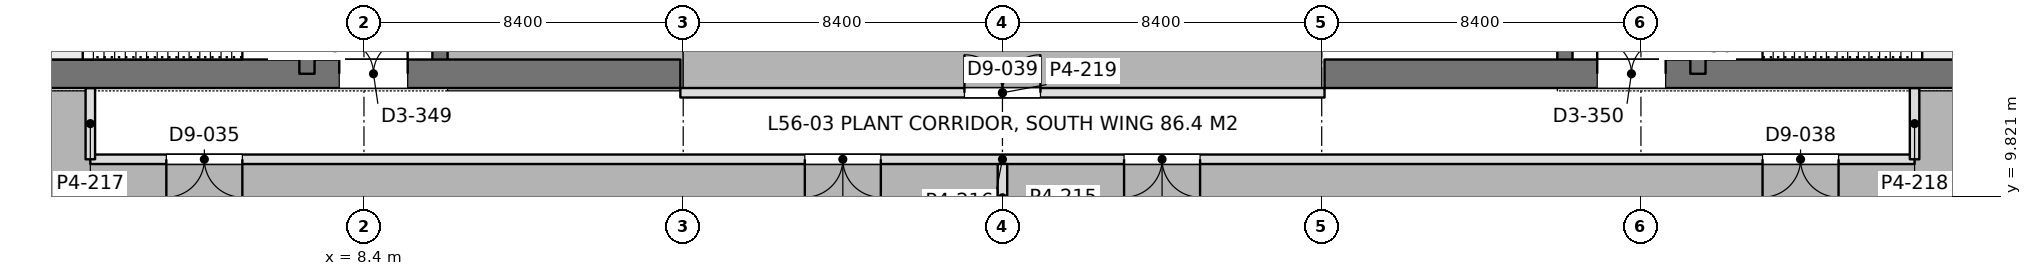
"""IFC4 building model, lengths in metres.
Left out: names, types, materials, properties, quantities, classifications, styles, units other than length and angle.
Written with IfcOpenShell. Run it as: python <this file> out.ifc"""

import sys

from ifc_helpers import new_model, si_unit, direction, frame, frame_2d, origin, place, context, subcontext, project, spatial, rectangle, extrude, element, fill, save


model = new_model("IFC4")
c1 = context("Model", 3, precision=1e-05, world=origin(), true_north=direction((0.0, 1.0)))
c2 = subcontext(c1, "Body", "Model", "MODEL_VIEW")
j1 = project(units=[si_unit("LENGTHUNIT", "METRE"), si_unit("PLANEANGLEUNIT", "RADIAN")], contexts=[c1])
p1 = place(None, origin())
s1 = spatial("IfcSite", under=j1, at=p1, CompositionType="ELEMENT")
p2 = place(p1, origin())
s2 = spatial("IfcBuilding", under=s1, at=p2, CompositionType="ELEMENT")
p3 = place(p2, frame((0.0, 0.0, 244.8)))
s3 = spatial("IfcBuildingStorey", under=s2, at=p3, CompositionType="ELEMENT", Elevation=244.8)
p4 = place(p3, frame((-1.125, 13.05, 0.0), z_axis=(0.0, 0.0, 1.0), x_axis=(1.0, 0.0, 0.0)))
e1 = element("IfcWall", 1, at=p4, inside=s3, PredefinedType="SHEAR", context=c2, shape_type="SweptSolid", body=[
    extrude(rectangle(XDim=17.85, YDim=0.75, at=frame_2d((8.925, 0.0))), origin(), (0.0, 0.0, 1.0), 5.4),
])
p5 = place(p4, frame((8.875, 0.0, 0.0)))
e2 = element("IfcOpeningElement", 2, at=p5, cuts=e1, PredefinedType="OPENING", context=c2, shape_type="SweptSolid", body=[
    extrude(rectangle(XDim=1.8, YDim=2.4, at=frame_2d((0.9, 1.2))), frame((0.0, 0.385, 0.0), z_axis=(0.0, -1.0, 0.0), x_axis=(1.0, 0.0, 0.0)), (0.0, 0.0, 1.0), 0.77),
])
p6 = place(p3, frame((6.9, 13.05, 0.0), z_axis=(0.0, 0.0, 1.0), x_axis=(0.0, 1.0, 0.0)))
e3 = element("IfcWall", 3, at=p6, inside=s3, PredefinedType="SHEAR", context=c2, shape_type="SweptSolid", body=[
    extrude(rectangle(XDim=24.3, YDim=0.4, at=frame_2d((12.15, 0.0))), origin(), (0.0, 0.0, 1.0), 5.4),
])
p7 = place(p6, frame((1.3, 0.0, 0.0)))
e4 = element("IfcOpeningElement", 4, at=p7, cuts=e3, PredefinedType="OPENING", context=c2, shape_type="SweptSolid", body=[
    extrude(rectangle(XDim=1.0, YDim=2.2, at=frame_2d((0.5, 1.1))), frame((0.0, 0.21, 0.0), z_axis=(0.0, -1.0, 0.0), x_axis=(1.0, 0.0, 0.0)), (0.0, 0.0, 1.0), 0.42),
])
p8 = place(p6, frame((22.0, 0.0, 0.0)))
e5 = element("IfcOpeningElement", 5, at=p8, cuts=e3, PredefinedType="OPENING", context=c2, shape_type="SweptSolid", body=[
    extrude(rectangle(XDim=1.0, YDim=2.2, at=frame_2d((0.5, 1.1))), frame((0.0, 0.21, 0.0), z_axis=(0.0, -1.0, 0.0), x_axis=(1.0, 0.0, 0.0)), (0.0, 0.0, 1.0), 0.42),
])
p9 = place(p6, frame((5.55, 0.0, 0.0)))
e6 = element("IfcOpeningElement", 6, at=p9, cuts=e3, PredefinedType="OPENING", context=c2, shape_type="SweptSolid", body=[
    extrude(rectangle(XDim=1.0, YDim=2.2, at=frame_2d((0.5, 1.1))), frame((0.0, 0.21, 0.0), z_axis=(0.0, -1.0, 0.0), x_axis=(1.0, 0.0, 0.0)), (0.0, 0.0, 1.0), 0.42),
])
p10 = place(p6, frame((9.55, 0.0, 0.0)))
e7 = element("IfcOpeningElement", 7, at=p10, cuts=e3, PredefinedType="OPENING", context=c2, shape_type="SweptSolid", body=[
    extrude(rectangle(XDim=1.0, YDim=2.2, at=frame_2d((0.5, 1.1))), frame((0.0, 0.21, 0.0), z_axis=(0.0, -1.0, 0.0), x_axis=(1.0, 0.0, 0.0)), (0.0, 0.0, 1.0), 0.42),
])
p11 = place(p6, frame((12.8, 0.0, 0.0)))
e8 = element("IfcOpeningElement", 8, at=p11, cuts=e3, PredefinedType="OPENING", context=c2, shape_type="SweptSolid", body=[
    extrude(rectangle(XDim=1.1, YDim=2.2, at=frame_2d((0.55, 1.1))), frame((0.0, 0.21, 0.0), z_axis=(0.0, -1.0, 0.0), x_axis=(1.0, 0.0, 0.0)), (0.0, 0.0, 1.0), 0.42),
])
p12 = place(p6, frame((15.538, 0.0, 0.0)))
e9 = element("IfcOpeningElement", 9, at=p12, cuts=e3, PredefinedType="OPENING", context=c2, shape_type="SweptSolid", body=[
    extrude(rectangle(XDim=1.1, YDim=2.2, at=frame_2d((0.55, 1.1))), frame((0.0, 0.21, 0.0), z_axis=(0.0, -1.0, 0.0), x_axis=(1.0, 0.0, 0.0)), (0.0, 0.0, 1.0), 0.42),
])
p13 = place(p6, frame((18.262, 0.0, 0.0)))
e10 = element("IfcOpeningElement", 10, at=p13, cuts=e3, PredefinedType="OPENING", context=c2, shape_type="SweptSolid", body=[
    extrude(rectangle(XDim=1.1, YDim=2.2, at=frame_2d((0.55, 1.1))), frame((0.0, 0.21, 0.0), z_axis=(0.0, -1.0, 0.0), x_axis=(1.0, 0.0, 0.0)), (0.0, 0.0, 1.0), 0.42),
])
p14 = place(p3, frame((10.4, 13.05, 0.0), z_axis=(0.0, 0.0, 1.0), x_axis=(0.0, 1.0, 0.0)))
e11 = element("IfcWall", 11, at=p14, inside=s3, PredefinedType="SHEAR", context=c2, shape_type="SweptSolid", body=[
    extrude(rectangle(XDim=24.3, YDim=0.4, at=frame_2d((12.15, 0.0))), origin(), (0.0, 0.0, 1.0), 5.4),
])
p15 = place(p14, frame((15.75, 0.0, 0.0)))
e12 = element("IfcOpeningElement", 12, at=p15, cuts=e11, PredefinedType="OPENING", context=c2, shape_type="SweptSolid", body=[
    extrude(rectangle(XDim=1.1, YDim=2.2, at=frame_2d((0.55, 1.1))), frame((0.0, 0.21, 0.0), z_axis=(0.0, -1.0, 0.0), x_axis=(1.0, 0.0, 0.0)), (0.0, 0.0, 1.0), 0.42),
])
p16 = place(p14, frame((18.6, 0.0, 0.0)))
e13 = element("IfcOpeningElement", 13, at=p16, cuts=e11, PredefinedType="OPENING", context=c2, shape_type="SweptSolid", body=[
    extrude(rectangle(XDim=1.1, YDim=2.2, at=frame_2d((0.55, 1.1))), frame((0.0, 0.21, 0.0), z_axis=(0.0, -1.0, 0.0), x_axis=(1.0, 0.0, 0.0)), (0.0, 0.0, 1.0), 0.42),
])
p17 = place(p14, frame((21.45, 0.0, 0.0)))
e14 = element("IfcOpeningElement", 14, at=p17, cuts=e11, PredefinedType="OPENING", context=c2, shape_type="SweptSolid", body=[
    extrude(rectangle(XDim=1.1, YDim=2.2, at=frame_2d((0.55, 1.1))), frame((0.0, 0.21, 0.0), z_axis=(0.0, -1.0, 0.0), x_axis=(1.0, 0.0, 0.0)), (0.0, 0.0, 1.0), 0.42),
])
p18 = place(p14, frame((8.65, 0.0, 0.0)))
e15 = element("IfcOpeningElement", 15, at=p18, cuts=e11, PredefinedType="OPENING", context=c2, shape_type="SweptSolid", body=[
    extrude(rectangle(XDim=1.8, YDim=2.4, at=frame_2d((0.9, 1.2))), frame((0.0, 0.21, 0.0), z_axis=(0.0, -1.0, 0.0), x_axis=(1.0, 0.0, 0.0)), (0.0, 0.0, 1.0), 0.42),
])
p19 = place(p14, frame((1.05, 0.0, 0.0)))
e16 = element("IfcOpeningElement", 16, at=p19, cuts=e11, PredefinedType="OPENING", context=c2, shape_type="SweptSolid", body=[
    extrude(rectangle(XDim=1.8, YDim=2.4, at=frame_2d((0.9, 1.2))), frame((0.0, 0.21, 0.0), z_axis=(0.0, -1.0, 0.0), x_axis=(1.0, 0.0, 0.0)), (0.0, 0.0, 1.0), 0.42),
])
p20 = place(p3, frame((33.675, 13.05, 0.0), z_axis=(0.0, 0.0, 1.0), x_axis=(1.0, 0.0, 0.0)))
e17 = element("IfcWall", 17, at=p20, inside=s3, PredefinedType="SHEAR", context=c2, shape_type="SweptSolid", body=[
    extrude(rectangle(XDim=17.85, YDim=0.75, at=frame_2d((8.925, 0.0))), origin(), (0.0, 0.0, 1.0), 5.4),
])
p21 = place(p20, frame((7.175, 0.0, 0.0)))
e18 = element("IfcOpeningElement", 18, at=p21, cuts=e17, PredefinedType="OPENING", context=c2, shape_type="SweptSolid", body=[
    extrude(rectangle(XDim=1.8, YDim=2.4, at=frame_2d((0.9, 1.2))), frame((0.0, 0.385, 0.0), z_axis=(0.0, -1.0, 0.0), x_axis=(1.0, 0.0, 0.0)), (0.0, 0.0, 1.0), 0.77),
])
p22 = place(p3, frame((43.5, 13.05, 0.0), z_axis=(0.0, 0.0, 1.0), x_axis=(0.0, 1.0, 0.0)))
e19 = element("IfcWall", 19, at=p22, inside=s3, PredefinedType="SHEAR", context=c2, shape_type="SweptSolid", body=[
    extrude(rectangle(XDim=24.3, YDim=0.4, at=frame_2d((12.15, 0.0))), origin(), (0.0, 0.0, 1.0), 5.4),
])
p23 = place(p22, frame((1.3, 0.0, 0.0)))
e20 = element("IfcOpeningElement", 20, at=p23, cuts=e19, PredefinedType="OPENING", context=c2, shape_type="SweptSolid", body=[
    extrude(rectangle(XDim=1.0, YDim=2.2, at=frame_2d((0.5, 1.1))), frame((0.0, 0.21, 0.0), z_axis=(0.0, -1.0, 0.0), x_axis=(1.0, 0.0, 0.0)), (0.0, 0.0, 1.0), 0.42),
])
p24 = place(p22, frame((22.0, 0.0, 0.0)))
e21 = element("IfcOpeningElement", 21, at=p24, cuts=e19, PredefinedType="OPENING", context=c2, shape_type="SweptSolid", body=[
    extrude(rectangle(XDim=1.0, YDim=2.2, at=frame_2d((0.5, 1.1))), frame((0.0, 0.21, 0.0), z_axis=(0.0, -1.0, 0.0), x_axis=(1.0, 0.0, 0.0)), (0.0, 0.0, 1.0), 0.42),
])
p25 = place(p22, frame((5.55, 0.0, 0.0)))
e22 = element("IfcOpeningElement", 22, at=p25, cuts=e19, PredefinedType="OPENING", context=c2, shape_type="SweptSolid", body=[
    extrude(rectangle(XDim=1.0, YDim=2.2, at=frame_2d((0.5, 1.1))), frame((0.0, 0.21, 0.0), z_axis=(0.0, -1.0, 0.0), x_axis=(1.0, 0.0, 0.0)), (0.0, 0.0, 1.0), 0.42),
])
p26 = place(p22, frame((9.55, 0.0, 0.0)))
e23 = element("IfcOpeningElement", 23, at=p26, cuts=e19, PredefinedType="OPENING", context=c2, shape_type="SweptSolid", body=[
    extrude(rectangle(XDim=1.0, YDim=2.2, at=frame_2d((0.5, 1.1))), frame((0.0, 0.21, 0.0), z_axis=(0.0, -1.0, 0.0), x_axis=(1.0, 0.0, 0.0)), (0.0, 0.0, 1.0), 0.42),
])
p27 = place(p22, frame((12.8, 0.0, 0.0)))
e24 = element("IfcOpeningElement", 24, at=p27, cuts=e19, PredefinedType="OPENING", context=c2, shape_type="SweptSolid", body=[
    extrude(rectangle(XDim=1.1, YDim=2.2, at=frame_2d((0.55, 1.1))), frame((0.0, 0.21, 0.0), z_axis=(0.0, -1.0, 0.0), x_axis=(1.0, 0.0, 0.0)), (0.0, 0.0, 1.0), 0.42),
])
p28 = place(p22, frame((15.538, 0.0, 0.0)))
e25 = element("IfcOpeningElement", 25, at=p28, cuts=e19, PredefinedType="OPENING", context=c2, shape_type="SweptSolid", body=[
    extrude(rectangle(XDim=1.1, YDim=2.2, at=frame_2d((0.55, 1.1))), frame((0.0, 0.21, 0.0), z_axis=(0.0, -1.0, 0.0), x_axis=(1.0, 0.0, 0.0)), (0.0, 0.0, 1.0), 0.42),
])
p29 = place(p22, frame((18.262, 0.0, 0.0)))
e26 = element("IfcOpeningElement", 26, at=p29, cuts=e19, PredefinedType="OPENING", context=c2, shape_type="SweptSolid", body=[
    extrude(rectangle(XDim=1.1, YDim=2.2, at=frame_2d((0.55, 1.1))), frame((0.0, 0.21, 0.0), z_axis=(0.0, -1.0, 0.0), x_axis=(1.0, 0.0, 0.0)), (0.0, 0.0, 1.0), 0.42),
])
p30 = place(p3, frame((40.0, 13.05, 0.0), z_axis=(0.0, 0.0, 1.0), x_axis=(0.0, 1.0, 0.0)))
e27 = element("IfcWall", 27, at=p30, inside=s3, PredefinedType="SHEAR", context=c2, shape_type="SweptSolid", body=[
    extrude(rectangle(XDim=24.3, YDim=0.4, at=frame_2d((12.15, 0.0))), origin(), (0.0, 0.0, 1.0), 5.4),
])
p31 = place(p30, frame((15.75, 0.0, 0.0)))
e28 = element("IfcOpeningElement", 28, at=p31, cuts=e27, PredefinedType="OPENING", context=c2, shape_type="SweptSolid", body=[
    extrude(rectangle(XDim=1.1, YDim=2.2, at=frame_2d((0.55, 1.1))), frame((0.0, 0.21, 0.0), z_axis=(0.0, -1.0, 0.0), x_axis=(1.0, 0.0, 0.0)), (0.0, 0.0, 1.0), 0.42),
])
p32 = place(p30, frame((18.6, 0.0, 0.0)))
e29 = element("IfcOpeningElement", 29, at=p32, cuts=e27, PredefinedType="OPENING", context=c2, shape_type="SweptSolid", body=[
    extrude(rectangle(XDim=1.1, YDim=2.2, at=frame_2d((0.55, 1.1))), frame((0.0, 0.21, 0.0), z_axis=(0.0, -1.0, 0.0), x_axis=(1.0, 0.0, 0.0)), (0.0, 0.0, 1.0), 0.42),
])
p33 = place(p30, frame((21.45, 0.0, 0.0)))
e30 = element("IfcOpeningElement", 30, at=p33, cuts=e27, PredefinedType="OPENING", context=c2, shape_type="SweptSolid", body=[
    extrude(rectangle(XDim=1.1, YDim=2.2, at=frame_2d((0.55, 1.1))), frame((0.0, 0.21, 0.0), z_axis=(0.0, -1.0, 0.0), x_axis=(1.0, 0.0, 0.0)), (0.0, 0.0, 1.0), 0.42),
])
p34 = place(p30, frame((8.65, 0.0, 0.0)))
e31 = element("IfcOpeningElement", 31, at=p34, cuts=e27, PredefinedType="OPENING", context=c2, shape_type="SweptSolid", body=[
    extrude(rectangle(XDim=1.8, YDim=2.4, at=frame_2d((0.9, 1.2))), frame((0.0, 0.21, 0.0), z_axis=(0.0, -1.0, 0.0), x_axis=(1.0, 0.0, 0.0)), (0.0, 0.0, 1.0), 0.42),
])
p35 = place(p30, frame((1.05, 0.0, 0.0)))
e32 = element("IfcOpeningElement", 32, at=p35, cuts=e27, PredefinedType="OPENING", context=c2, shape_type="SweptSolid", body=[
    extrude(rectangle(XDim=1.8, YDim=2.4, at=frame_2d((0.9, 1.2))), frame((0.0, 0.21, 0.0), z_axis=(0.0, -1.0, 0.0), x_axis=(1.0, 0.0, 0.0)), (0.0, 0.0, 1.0), 0.42),
])
p36 = place(p3, frame((1.2, 10.8, 0.0), z_axis=(0.0, 0.0, 1.0), x_axis=(1.0, 0.0, 0.0)))
e33 = element("IfcWall", 33, at=p36, inside=s3, PredefinedType="PARTITIONING", context=c2, shape_type="SweptSolid", body=[
    extrude(rectangle(XDim=48.0, YDim=0.25, at=frame_2d((24.0, 0.0))), origin(), (0.0, 0.0, 1.0), 4.7),
])
p37 = place(p36, frame((2.0, 0.0, 0.0)))
e34 = element("IfcOpeningElement", 34, at=p37, cuts=e33, PredefinedType="OPENING", context=c2, shape_type="SweptSolid", body=[
    extrude(rectangle(XDim=2.0, YDim=2.4, at=frame_2d((1.0, 1.2))), frame((0.0, 0.135, 0.0), z_axis=(0.0, -1.0, 0.0), x_axis=(1.0, 0.0, 0.0)), (0.0, 0.0, 1.0), 0.27),
])
p38 = place(p36, frame((18.8, 0.0, 0.0)))
e35 = element("IfcOpeningElement", 35, at=p38, cuts=e33, PredefinedType="OPENING", context=c2, shape_type="SweptSolid", body=[
    extrude(rectangle(XDim=2.0, YDim=2.4, at=frame_2d((1.0, 1.2))), frame((0.0, 0.135, 0.0), z_axis=(0.0, -1.0, 0.0), x_axis=(1.0, 0.0, 0.0)), (0.0, 0.0, 1.0), 0.27),
])
p39 = place(p36, frame((27.2, 0.0, 0.0)))
e36 = element("IfcOpeningElement", 36, at=p39, cuts=e33, PredefinedType="OPENING", context=c2, shape_type="SweptSolid", body=[
    extrude(rectangle(XDim=2.0, YDim=2.4, at=frame_2d((1.0, 1.2))), frame((0.0, 0.135, 0.0), z_axis=(0.0, -1.0, 0.0), x_axis=(1.0, 0.0, 0.0)), (0.0, 0.0, 1.0), 0.27),
])
p40 = place(p36, frame((44.0, 0.0, 0.0)))
e37 = element("IfcOpeningElement", 37, at=p40, cuts=e33, PredefinedType="OPENING", context=c2, shape_type="SweptSolid", body=[
    extrude(rectangle(XDim=2.0, YDim=2.4, at=frame_2d((1.0, 1.2))), frame((0.0, 0.135, 0.0), z_axis=(0.0, -1.0, 0.0), x_axis=(1.0, 0.0, 0.0)), (0.0, 0.0, 1.0), 0.27),
])
for number, where, z_axis, x_axis in (
    (38, (1.2, 10.8, 0.0), (0.0, 0.0, 1.0), (0.0, 1.0, 0.0)),
    (39, (49.2, 10.8, 0.0), (0.0, 0.0, 1.0), (0.0, 1.0, 0.0)),
):
    element("IfcWall", number, at=place(p3, frame(where, z_axis=z_axis, x_axis=x_axis)), inside=s3, PredefinedType="PARTITIONING", context=c2, shape_type="SweptSolid", body=[
        extrude(rectangle(XDim=1.876, YDim=0.25, at=frame_2d((0.938, 0.0))), origin(), (0.0, 0.0, 1.0), 5.25),
    ])
p41 = place(p3, frame((25.2, 8.899, 0.0), z_axis=(0.0, 0.0, 1.0), x_axis=(0.0, 1.0, 0.0)))
e40 = element("IfcWall", 40, at=p41, inside=s3, PredefinedType="PARTITIONING", context=c2, shape_type="SweptSolid", body=[
    extrude(rectangle(XDim=1.777, YDim=0.25, at=frame_2d((0.889, 0.0))), origin(), (0.0, 0.0, 1.0), 4.7),
])
p42 = place(p3, frame((16.725, 12.55, 0.0), z_axis=(0.0, 0.0, 1.0), x_axis=(1.0, 0.0, 0.0)))
e41 = element("IfcWall", 41, at=p42, inside=s3, PredefinedType="PARTITIONING", context=c2, shape_type="SweptSolid", body=[
    extrude(rectangle(XDim=16.95, YDim=0.25, at=frame_2d((8.475, 0.0))), origin(), (0.0, 0.0, 1.0), 4.7),
])
p43 = place(p42, frame((7.475, 0.0, 0.0)))
e42 = element("IfcOpeningElement", 42, at=p43, cuts=e41, PredefinedType="OPENING", context=c2, shape_type="SweptSolid", body=[
    extrude(rectangle(XDim=2.0, YDim=2.4, at=frame_2d((1.0, 1.2))), frame((0.0, 0.135, 0.0), z_axis=(0.0, -1.0, 0.0), x_axis=(1.0, 0.0, 0.0)), (0.0, 0.0, 1.0), 0.27),
])
p44 = place(p5, origin())
e43 = element("IfcDoor", 43, at=p44, inside=s3, OperationType="DOUBLE_DOOR_SINGLE_SWING", PredefinedType="DOOR", context=c2, shape_type="SweptSolid", body=[
    extrude(rectangle(XDim=1.8, YDim=2.4, at=frame_2d((0.9, 1.2))), frame((0.0, 0.025, 0.0), z_axis=(0.0, -1.0, 0.0), x_axis=(1.0, 0.0, 0.0)), (0.0, 0.0, 1.0), 0.05),
])
fill(e2, e43)
p45 = place(p21, origin())
e44 = element("IfcDoor", 44, at=p45, inside=s3, OperationType="DOUBLE_DOOR_SINGLE_SWING", PredefinedType="DOOR", context=c2, shape_type="SweptSolid", body=[
    extrude(rectangle(XDim=1.8, YDim=2.4, at=frame_2d((0.9, 1.2))), frame((0.0, 0.025, 0.0), z_axis=(0.0, -1.0, 0.0), x_axis=(1.0, 0.0, 0.0)), (0.0, 0.0, 1.0), 0.05),
])
fill(e18, e44)
p46 = place(p37, frame((2.0, 0.0, 0.0), z_axis=(0.0, 0.0, 1.0), x_axis=(-1.0, 0.0, 0.0)))
e45 = element("IfcDoor", 45, at=p46, inside=s3, OperationType="DOUBLE_DOOR_SINGLE_SWING", PredefinedType="DOOR", context=c2, shape_type="SweptSolid", body=[
    extrude(rectangle(XDim=2.0, YDim=2.4, at=frame_2d((1.0, 1.2))), frame((0.0, 0.025, 0.0), z_axis=(0.0, -1.0, 0.0), x_axis=(1.0, 0.0, 0.0)), (0.0, 0.0, 1.0), 0.05),
])
fill(e34, e45)
p47 = place(p38, frame((2.0, 0.0, 0.0), z_axis=(0.0, 0.0, 1.0), x_axis=(-1.0, 0.0, 0.0)))
e46 = element("IfcDoor", 46, at=p47, inside=s3, OperationType="DOUBLE_DOOR_SINGLE_SWING", PredefinedType="DOOR", context=c2, shape_type="SweptSolid", body=[
    extrude(rectangle(XDim=2.0, YDim=2.4, at=frame_2d((1.0, 1.2))), frame((0.0, 0.025, 0.0), z_axis=(0.0, -1.0, 0.0), x_axis=(1.0, 0.0, 0.0)), (0.0, 0.0, 1.0), 0.05),
])
fill(e35, e46)
p48 = place(p39, frame((2.0, 0.0, 0.0), z_axis=(0.0, 0.0, 1.0), x_axis=(-1.0, 0.0, 0.0)))
e47 = element("IfcDoor", 47, at=p48, inside=s3, OperationType="DOUBLE_DOOR_SINGLE_SWING", PredefinedType="DOOR", context=c2, shape_type="SweptSolid", body=[
    extrude(rectangle(XDim=2.0, YDim=2.4, at=frame_2d((1.0, 1.2))), frame((0.0, 0.025, 0.0), z_axis=(0.0, -1.0, 0.0), x_axis=(1.0, 0.0, 0.0)), (0.0, 0.0, 1.0), 0.05),
])
fill(e36, e47)
p49 = place(p40, frame((2.0, 0.0, 0.0), z_axis=(0.0, 0.0, 1.0), x_axis=(-1.0, 0.0, 0.0)))
e48 = element("IfcDoor", 48, at=p49, inside=s3, OperationType="DOUBLE_DOOR_SINGLE_SWING", PredefinedType="DOOR", context=c2, shape_type="SweptSolid", body=[
    extrude(rectangle(XDim=2.0, YDim=2.4, at=frame_2d((1.0, 1.2))), frame((0.0, 0.025, 0.0), z_axis=(0.0, -1.0, 0.0), x_axis=(1.0, 0.0, 0.0)), (0.0, 0.0, 1.0), 0.05),
])
fill(e37, e48)
p50 = place(p43, origin())
e49 = element("IfcDoor", 49, at=p50, inside=s3, OperationType="DOUBLE_DOOR_SINGLE_SWING", PredefinedType="DOOR", context=c2, shape_type="SweptSolid", body=[
    extrude(rectangle(XDim=2.0, YDim=2.4, at=frame_2d((1.0, 1.2))), frame((0.0, 0.025, 0.0), z_axis=(0.0, -1.0, 0.0), x_axis=(1.0, 0.0, 0.0)), (0.0, 0.0, 1.0), 0.05),
])
fill(e42, e49)
save(model, sys.argv[1])
